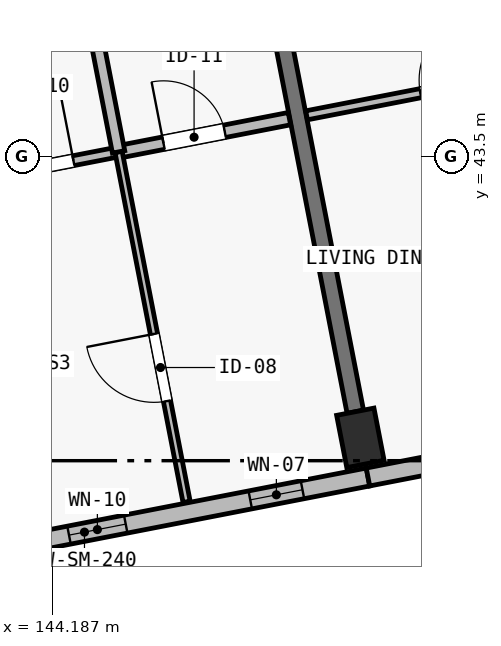
"""IFC4 building model, lengths in metres.
Left out: names, types, materials, properties, quantities, classifications, styles, units other than length and angle.
Written with IfcOpenShell. Run it as: python <this file> out.ifc"""

import sys

from ifc_helpers import new_model, si_unit, direction, frame, frame_2d, origin, origin_2d, place, context, subcontext, project, spatial, rectangle, extrude, element, fill, save


model = new_model("IFC4")
c1 = context("Model", 3, precision=1e-05, world=origin(), true_north=direction((0.0, 1.0)))
c2 = subcontext(c1, "Body", "Model", "MODEL_VIEW")
j1 = project(units=[si_unit("LENGTHUNIT", "METRE"), si_unit("PLANEANGLEUNIT", "RADIAN")], contexts=[c1])
p1 = place(None, origin())
s1 = spatial("IfcSite", under=j1, at=p1, CompositionType="ELEMENT")
p2 = place(p1, origin())
s2 = spatial("IfcBuilding", under=s1, at=p2, CompositionType="ELEMENT")
p3 = place(p2, frame((0.0, 0.0, 14.9)))
s3 = spatial("IfcBuildingStorey", under=s2, at=p3, CompositionType="ELEMENT", Elevation=14.9)
p4 = place(p3, frame((148.241, 39.801, 0.0), z_axis=(0.0, 0.0, 1.0), x_axis=(0.981627183448, 0.190808995377, 0.0)))
e1 = element("IfcColumn", 1, at=p4, inside=s3, PredefinedType="COLUMN", context=c2, shape_type="SweptSolid", body=[
    extrude(rectangle(XDim=0.5, YDim=0.7, at=origin_2d()), origin(), (0.0, 0.0, 1.0), 3.25),
])
p5 = place(p3, frame((148.175, 40.144, 0.0), z_axis=(0.0, 0.0, 1.0), x_axis=(-0.190812837813, 0.981626436546, 0.0)))
e2 = element("IfcWall", 2, at=p5, inside=s3, PredefinedType="SHEAR", context=c2, shape_type="SweptSolid", body=[
    extrude(rectangle(XDim=6.9, YDim=0.22, at=frame_2d((3.45, 0.0))), origin(), (0.0, 0.0, 1.0), 2.5),
])
p6 = place(p3, frame((148.342, 39.285, 0.0), z_axis=(0.0, 0.0, 1.0), x_axis=(-0.981631269434, -0.190787973596, 0.0)))
e3 = element("IfcWall", 3, at=p6, inside=s3, PredefinedType="SOLIDWALL", context=c2, shape_type="SweptSolid", body=[
    extrude(rectangle(XDim=7.6, YDim=0.24, at=frame_2d((3.8, 0.0))), origin(), (0.0, 0.0, 1.0), 3.0),
])
p7 = place(p6, frame((0.878, 0.0, 0.48)))
e4 = element("IfcOpeningElement", 4, at=p7, cuts=e3, PredefinedType="OPENING", context=c2, shape_type="SweptSolid", body=[
    extrude(rectangle(XDim=0.7, YDim=2.36, at=frame_2d((0.35, 1.18))), frame((0.0, 0.135, 0.0), z_axis=(0.0, -1.0, 0.0), x_axis=(1.0, 0.0, 0.0)), (0.0, 0.0, 1.0), 0.27),
])
p8 = place(p6, frame((3.247, 0.0, 0.48)))
e5 = element("IfcOpeningElement", 5, at=p8, cuts=e3, PredefinedType="OPENING", context=c2, shape_type="SweptSolid", body=[
    extrude(rectangle(XDim=0.76, YDim=2.34, at=frame_2d((0.38, 1.17))), frame((0.0, 0.135, 0.0), z_axis=(0.0, -1.0, 0.0), x_axis=(1.0, 0.0, 0.0)), (0.0, 0.0, 1.0), 0.27),
])
p9 = place(p3, frame((155.802, 40.735, 0.0), z_axis=(0.0, 0.0, 1.0), x_axis=(-0.981626422232, -0.190812911449, 0.0)))
e6 = element("IfcWall", 6, at=p9, inside=s3, PredefinedType="SOLIDWALL", context=c2, shape_type="SweptSolid", body=[
    extrude(rectangle(XDim=7.6, YDim=0.24, at=frame_2d((3.8, 0.0))), origin(), (0.0, 0.0, 1.0), 3.0),
])
p10 = place(p9, frame((0.813, 0.0, 0.52)))
e7 = element("IfcOpeningElement", 7, at=p10, cuts=e6, PredefinedType="OPENING", context=c2, shape_type="SweptSolid", body=[
    extrude(rectangle(XDim=0.8, YDim=2.3, at=frame_2d((0.4, 1.15))), frame((0.0, 0.135, 0.0), z_axis=(0.0, -1.0, 0.0), x_axis=(1.0, 0.0, 0.0)), (0.0, 0.0, 1.0), 0.27),
])
p11 = place(p9, frame((5.377, 0.0, 0.5)))
e8 = element("IfcOpeningElement", 8, at=p11, cuts=e6, PredefinedType="OPENING", context=c2, shape_type="SweptSolid", body=[
    extrude(rectangle(XDim=0.86, YDim=2.36, at=frame_2d((0.43, 1.18))), frame((0.0, 0.135, 0.0), z_axis=(0.0, -1.0, 0.0), x_axis=(1.0, 0.0, 0.0)), (0.0, 0.0, 1.0), 0.27),
])
p12 = place(p3, frame((140.073, 42.594, 0.0), z_axis=(0.0, 0.0, 1.0), x_axis=(0.981629144122, 0.190798908307, 0.0)))
e9 = element("IfcWall", 9, at=p12, inside=s3, PredefinedType="PARTITIONING", context=c2, shape_type="SweptSolid", body=[
    extrude(rectangle(XDim=5.08, YDim=0.13, at=frame_2d((2.54, 0.0))), origin(), (0.0, 0.0, 1.0), 2.97),
])
p13 = place(p12, frame((3.595, 0.0, 0.0)))
e10 = element("IfcOpeningElement", 10, at=p13, cuts=e9, PredefinedType="OPENING", context=c2, shape_type="SweptSolid", body=[
    extrude(rectangle(XDim=0.88, YDim=2.1, at=frame_2d((0.44, 1.05))), frame((0.0, 0.08, 0.0), z_axis=(0.0, -1.0, 0.0), x_axis=(1.0, 0.0, 0.0)), (0.0, 0.0, 1.0), 0.16),
])
p14 = place(p3, frame((145.06, 43.563, 0.0), z_axis=(0.0, 0.0, 1.0), x_axis=(0.981624265801, 0.190824004755, 0.0)))
e11 = element("IfcWall", 11, at=p14, inside=s3, PredefinedType="PLUMBINGWALL", context=c2, shape_type="SweptSolid", body=[
    extrude(rectangle(XDim=2.29, YDim=0.165, at=frame_2d((1.145, 0.0))), origin(), (0.0, 0.0, 1.0), 2.97),
])
p15 = place(p14, frame((0.602, 0.0, 0.0)))
e12 = element("IfcOpeningElement", 12, at=p15, cuts=e11, PredefinedType="OPENING", context=c2, shape_type="SweptSolid", body=[
    extrude(rectangle(XDim=0.82, YDim=2.08, at=frame_2d((0.41, 1.04))), frame((0.0, 0.097, 0.0), z_axis=(0.0, -1.0, 0.0), x_axis=(1.0, 0.0, 0.0)), (0.0, 0.0, 1.0), 0.195),
])
p16 = place(p3, frame((145.955, 38.959, 0.0), z_axis=(0.0, 0.0, 1.0), x_axis=(-0.190837612577, 0.981621620394, 0.0)))
e13 = element("IfcWall", 13, at=p16, inside=s3, PredefinedType="PARTITIONING", context=c2, shape_type="SweptSolid", body=[
    extrude(rectangle(XDim=4.69, YDim=0.095, at=frame_2d((2.345, 0.0))), origin(), (0.0, 0.0, 1.0), 2.97),
])
p17 = place(p16, frame((1.35, 0.0, 0.0)))
e14 = element("IfcOpeningElement", 14, at=p17, cuts=e13, PredefinedType="OPENING", context=c2, shape_type="SweptSolid", body=[
    extrude(rectangle(XDim=0.9, YDim=2.1, at=frame_2d((0.45, 1.05))), frame((0.0, 0.062, 0.0), z_axis=(0.0, -1.0, 0.0), x_axis=(1.0, 0.0, 0.0)), (0.0, 0.0, 1.0), 0.125),
])
p18 = place(p3, frame((145.06, 43.563, 0.0), z_axis=(0.0, 0.0, 1.0), x_axis=(-0.190787096078, 0.981631439987, 0.0)))
e15 = element("IfcWall", 15, at=p18, inside=s3, PredefinedType="PLUMBINGWALL", context=c2, shape_type="SweptSolid", body=[
    extrude(rectangle(XDim=3.72, YDim=0.165, at=frame_2d((1.86, 0.0))), origin(), (0.0, 0.0, 1.0), 2.97),
])
p19 = place(p3, frame((147.534, 44.043, 0.0), z_axis=(0.0, 0.0, 1.0), x_axis=(0.981626422232, 0.190812911449, 0.0)))
e16 = element("IfcWall", 16, at=p19, inside=s3, PredefinedType="PARTITIONING", context=c2, shape_type="SweptSolid", body=[
    extrude(rectangle(XDim=3.685, YDim=0.12, at=frame_2d((1.842, 0.0))), origin(), (0.0, 0.0, 1.0), 2.97),
])
p20 = place(p19, frame((1.525, 0.0, 0.0)))
e17 = element("IfcOpeningElement", 17, at=p20, cuts=e16, PredefinedType="OPENING", context=c2, shape_type="SweptSolid", body=[
    extrude(rectangle(XDim=0.9, YDim=2.1, at=frame_2d((0.45, 1.05))), frame((0.0, 0.075, 0.0), z_axis=(0.0, -1.0, 0.0), x_axis=(1.0, 0.0, 0.0)), (0.0, 0.0, 1.0), 0.15),
])
p21 = place(p7, origin())
e18 = element("IfcWindow", 18, at=p21, inside=s3, PartitioningType="SINGLE_PANEL", PredefinedType="WINDOW", context=c2, shape_type="SweptSolid", body=[
    extrude(rectangle(XDim=0.7, YDim=2.36, at=frame_2d((0.35, 1.18))), frame((0.0, 0.03, 0.0), z_axis=(0.0, -1.0, 0.0), x_axis=(1.0, 0.0, 0.0)), (0.0, 0.0, 1.0), 0.06),
])
fill(e4, e18)
p22 = place(p8, origin())
e19 = element("IfcWindow", 19, at=p22, inside=s3, PartitioningType="SINGLE_PANEL", PredefinedType="WINDOW", context=c2, shape_type="SweptSolid", body=[
    extrude(rectangle(XDim=0.76, YDim=2.34, at=frame_2d((0.38, 1.17))), frame((0.0, 0.03, 0.0), z_axis=(0.0, -1.0, 0.0), x_axis=(1.0, 0.0, 0.0)), (0.0, 0.0, 1.0), 0.06),
])
fill(e5, e19)
p23 = place(p13, origin())
e20 = element("IfcDoor", 20, at=p23, inside=s3, OperationType="SINGLE_SWING_RIGHT", PredefinedType="DOOR", context=c2, shape_type="SweptSolid", body=[
    extrude(rectangle(XDim=0.88, YDim=2.1, at=frame_2d((0.44, 1.05))), frame((0.0, 0.025, 0.0), z_axis=(0.0, -1.0, 0.0), x_axis=(1.0, 0.0, 0.0)), (0.0, 0.0, 1.0), 0.05),
])
fill(e10, e20)
p24 = place(p15, origin())
e21 = element("IfcDoor", 21, at=p24, inside=s3, OperationType="SINGLE_SWING_LEFT", PredefinedType="DOOR", context=c2, shape_type="SweptSolid", body=[
    extrude(rectangle(XDim=0.82, YDim=2.08, at=frame_2d((0.41, 1.04))), frame((0.0, 0.025, 0.0), z_axis=(0.0, -1.0, 0.0), x_axis=(1.0, 0.0, 0.0)), (0.0, 0.0, 1.0), 0.05),
])
fill(e12, e21)
p25 = place(p17, origin())
e22 = element("IfcDoor", 22, at=p25, inside=s3, OperationType="SINGLE_SWING_RIGHT", PredefinedType="DOOR", context=c2, shape_type="SweptSolid", body=[
    extrude(rectangle(XDim=0.9, YDim=2.1, at=frame_2d((0.45, 1.05))), frame((0.0, 0.025, 0.0), z_axis=(0.0, -1.0, 0.0), x_axis=(1.0, 0.0, 0.0)), (0.0, 0.0, 1.0), 0.05),
])
fill(e14, e22)
p26 = place(p20, origin())
e23 = element("IfcDoor", 23, at=p26, inside=s3, OperationType="SINGLE_SWING_RIGHT", PredefinedType="DOOR", context=c2, shape_type="SweptSolid", body=[
    extrude(rectangle(XDim=0.9, YDim=2.1, at=frame_2d((0.45, 1.05))), frame((0.0, 0.025, 0.0), z_axis=(0.0, -1.0, 0.0), x_axis=(1.0, 0.0, 0.0)), (0.0, 0.0, 1.0), 0.05),
])
fill(e17, e23)
save(model, sys.argv[1])
